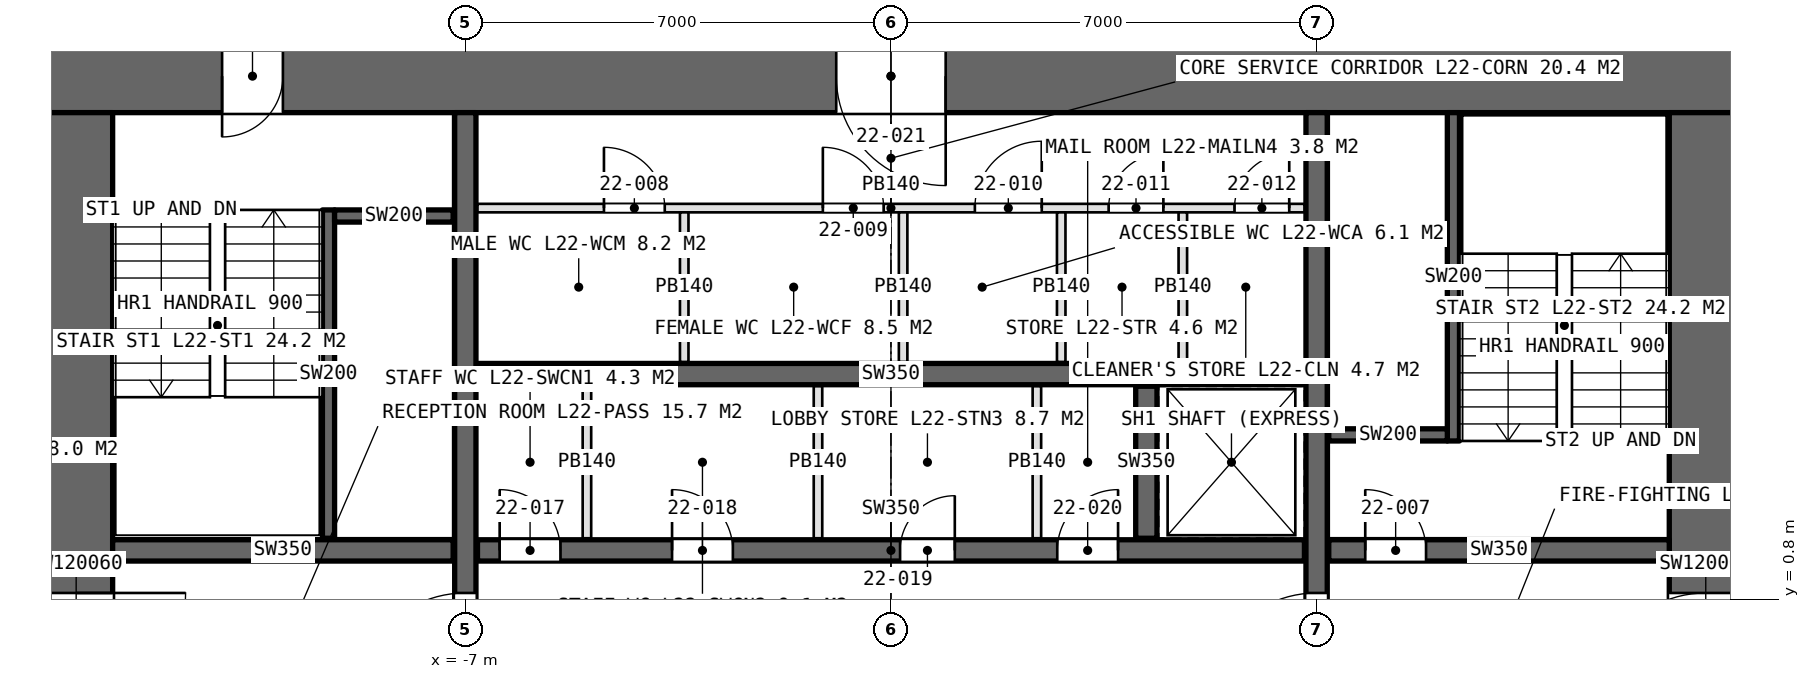
"""IFC4 building model, lengths in metres.
Left out: names, types, materials, properties, quantities, classifications, styles, units other than length and angle.
Written with IfcOpenShell. Run it as: python <this file> out.ifc"""

import sys

from ifc_helpers import new_model, si_unit, direction, frame, frame_2d, origin, place, context, subcontext, project, spatial, rectangle, extrude, element, fill, save


model = new_model("IFC4")
c1 = context("Model", 3, precision=1e-05, world=origin(), true_north=direction((0.0, 1.0)))
c2 = subcontext(c1, "Body", "Model", "MODEL_VIEW")
j1 = project(units=[si_unit("LENGTHUNIT", "METRE"), si_unit("PLANEANGLEUNIT", "RADIAN")], contexts=[c1])
p1 = place(None, origin())
s1 = spatial("IfcSite", under=j1, at=p1, CompositionType="ELEMENT")
p2 = place(p1, origin())
s2 = spatial("IfcBuilding", under=s1, at=p2, CompositionType="ELEMENT")
p3 = place(p2, frame((0.0, 0.0, 109.2)))
s3 = spatial("IfcBuildingStorey", under=s2, at=p3, CompositionType="ELEMENT", Elevation=109.2)
p4 = place(p3, frame((14.0, 9.4, 0.0), z_axis=(0.0, 0.0, 1.0), x_axis=(-1.0, 0.0, 0.0)))
e1 = element("IfcWall", 1, at=p4, inside=s3, PredefinedType="SHEAR", context=c2, shape_type="SweptSolid", body=[
    extrude(rectangle(XDim=28.0, YDim=1.2, at=frame_2d((14.0, 0.0))), origin(), (0.0, 0.0, 1.0), 4.2),
])
p5 = place(p4, frame((24.0, 0.0, 0.0)))
e2 = element("IfcOpeningElement", 2, at=p5, cuts=e1, PredefinedType="OPENING", context=c2, shape_type="SweptSolid", body=[
    extrude(rectangle(XDim=1.0, YDim=2.4, at=frame_2d((0.5, 1.2))), frame((0.0, 0.61, 0.0), z_axis=(0.0, -1.0, 0.0), x_axis=(1.0, 0.0, 0.0)), (0.0, 0.0, 1.0), 1.22),
])
p6 = place(p4, frame((13.1, 0.0, 0.0)))
e3 = element("IfcOpeningElement", 3, at=p6, cuts=e1, PredefinedType="OPENING", context=c2, shape_type="SweptSolid", body=[
    extrude(rectangle(XDim=1.8, YDim=2.4, at=frame_2d((0.9, 1.2))), frame((0.0, 0.61, 0.0), z_axis=(0.0, -1.0, 0.0), x_axis=(1.0, 0.0, 0.0)), (0.0, 0.0, 1.0), 1.22),
])
p7 = place(p3, frame((-13.4, 8.8, 0.0), z_axis=(0.0, 0.0, 1.0), x_axis=(0.0, -1.0, 0.0)))
e4 = element("IfcWall", 4, at=p7, inside=s3, PredefinedType="SHEAR", context=c2, shape_type="SweptSolid", body=[
    extrude(rectangle(XDim=17.6, YDim=1.2, at=frame_2d((8.8, 0.0))), origin(), (0.0, 0.0, 1.0), 4.2),
])
p8 = place(p7, frame((7.9, 0.0, 0.0)))
e5 = element("IfcOpeningElement", 5, at=p8, cuts=e4, PredefinedType="OPENING", context=c2, shape_type="SweptSolid", body=[
    extrude(rectangle(XDim=1.8, YDim=2.4, at=frame_2d((0.9, 1.2))), frame((0.0, 0.61, 0.0), z_axis=(0.0, -1.0, 0.0), x_axis=(1.0, 0.0, 0.0)), (0.0, 0.0, 1.0), 1.22),
])
p9 = place(p7, frame((16.5, 0.0, 0.0)))
e6 = element("IfcOpeningElement", 6, at=p9, cuts=e4, PredefinedType="OPENING", context=c2, shape_type="SweptSolid", body=[
    extrude(rectangle(XDim=1.0, YDim=2.4, at=frame_2d((0.5, 1.2))), frame((0.0, 0.61, 0.0), z_axis=(0.0, -1.0, 0.0), x_axis=(1.0, 0.0, 0.0)), (0.0, 0.0, 1.0), 1.22),
])
p10 = place(p3, frame((13.4, -8.8, 0.0), z_axis=(0.0, 0.0, 1.0), x_axis=(0.0, 1.0, 0.0)))
e7 = element("IfcWall", 7, at=p10, inside=s3, PredefinedType="SHEAR", context=c2, shape_type="SweptSolid", body=[
    extrude(rectangle(XDim=17.6, YDim=1.2, at=frame_2d((8.8, 0.0))), origin(), (0.0, 0.0, 1.0), 4.2),
])
p11 = place(p10, frame((7.9, 0.0, 0.0)))
e8 = element("IfcOpeningElement", 8, at=p11, cuts=e7, PredefinedType="OPENING", context=c2, shape_type="SweptSolid", body=[
    extrude(rectangle(XDim=1.8, YDim=2.4, at=frame_2d((0.9, 1.2))), frame((0.0, 0.61, 0.0), z_axis=(0.0, -1.0, 0.0), x_axis=(1.0, 0.0, 0.0)), (0.0, 0.0, 1.0), 1.22),
])
p12 = place(p3, frame((-7.0, -8.8, 0.0), z_axis=(0.0, 0.0, 1.0), x_axis=(0.0, 1.0, 0.0)))
e9 = element("IfcWall", 9, at=p12, inside=s3, PredefinedType="SHEAR", context=c2, shape_type="SweptSolid", body=[
    extrude(rectangle(XDim=17.6, YDim=0.35, at=frame_2d((8.8, 0.0))), origin(), (0.0, 0.0, 1.0), 4.2),
])
p13 = place(p12, frame((7.9, 0.0, 0.0)))
e10 = element("IfcOpeningElement", 10, at=p13, cuts=e9, PredefinedType="OPENING", context=c2, shape_type="SweptSolid", body=[
    extrude(rectangle(XDim=1.8, YDim=2.4, at=frame_2d((0.9, 1.2))), frame((0.0, 0.185, 0.0), z_axis=(0.0, -1.0, 0.0), x_axis=(1.0, 0.0, 0.0)), (0.0, 0.0, 1.0), 0.37),
])
p14 = place(p3, frame((7.0, -8.8, 0.0), z_axis=(0.0, 0.0, 1.0), x_axis=(0.0, 1.0, 0.0)))
e11 = element("IfcWall", 11, at=p14, inside=s3, PredefinedType="SHEAR", context=c2, shape_type="SweptSolid", body=[
    extrude(rectangle(XDim=17.6, YDim=0.35, at=frame_2d((8.8, 0.0))), origin(), (0.0, 0.0, 1.0), 4.2),
])
p15 = place(p14, frame((7.9, 0.0, 0.0)))
e12 = element("IfcOpeningElement", 12, at=p15, cuts=e11, PredefinedType="OPENING", context=c2, shape_type="SweptSolid", body=[
    extrude(rectangle(XDim=1.8, YDim=2.4, at=frame_2d((0.9, 1.2))), frame((0.0, 0.185, 0.0), z_axis=(0.0, -1.0, 0.0), x_axis=(1.0, 0.0, 0.0)), (0.0, 0.0, 1.0), 0.37),
])
p16 = place(p3, frame((-6.8, 1.6, 0.0), z_axis=(0.0, 0.0, 1.0), x_axis=(1.0, 0.0, 0.0)))
e13 = element("IfcWall", 13, at=p16, inside=s3, PredefinedType="SHEAR", context=c2, shape_type="SweptSolid", body=[
    extrude(rectangle(XDim=13.6, YDim=0.35, at=frame_2d((6.8, 0.0))), origin(), (0.0, 0.0, 1.0), 4.2),
])
p17 = place(p16, frame((0.365, 0.0, 0.0)))
e14 = element("IfcOpeningElement", 14, at=p17, cuts=e13, PredefinedType="OPENING", context=c2, shape_type="SweptSolid", body=[
    extrude(rectangle(XDim=1.0, YDim=2.4, at=frame_2d((0.5, 1.2))), frame((0.0, 0.185, 0.0), z_axis=(0.0, -1.0, 0.0), x_axis=(1.0, 0.0, 0.0)), (0.0, 0.0, 1.0), 0.37),
])
p18 = place(p16, frame((3.2, 0.0, 0.0)))
e15 = element("IfcOpeningElement", 15, at=p18, cuts=e13, PredefinedType="OPENING", context=c2, shape_type="SweptSolid", body=[
    extrude(rectangle(XDim=1.0, YDim=2.4, at=frame_2d((0.5, 1.2))), frame((0.0, 0.185, 0.0), z_axis=(0.0, -1.0, 0.0), x_axis=(1.0, 0.0, 0.0)), (0.0, 0.0, 1.0), 0.37),
])
p19 = place(p16, frame((6.95, 0.0, 0.0)))
e16 = element("IfcOpeningElement", 16, at=p19, cuts=e13, PredefinedType="OPENING", context=c2, shape_type="SweptSolid", body=[
    extrude(rectangle(XDim=0.9, YDim=2.4, at=frame_2d((0.45, 1.2))), frame((0.0, 0.185, 0.0), z_axis=(0.0, -1.0, 0.0), x_axis=(1.0, 0.0, 0.0)), (0.0, 0.0, 1.0), 0.37),
])
p20 = place(p16, frame((9.535, 0.0, 0.0)))
e17 = element("IfcOpeningElement", 17, at=p20, cuts=e13, PredefinedType="OPENING", context=c2, shape_type="SweptSolid", body=[
    extrude(rectangle(XDim=1.0, YDim=2.4, at=frame_2d((0.5, 1.2))), frame((0.0, 0.185, 0.0), z_axis=(0.0, -1.0, 0.0), x_axis=(1.0, 0.0, 0.0)), (0.0, 0.0, 1.0), 0.37),
])
p21 = place(p3, frame((-6.8, 4.5, 0.0), z_axis=(0.0, 0.0, 1.0), x_axis=(1.0, 0.0, 0.0)))
e18 = element("IfcWall", 18, at=p21, inside=s3, PredefinedType="SHEAR", context=c2, shape_type="SweptSolid", body=[
    extrude(rectangle(XDim=13.6, YDim=0.35, at=frame_2d((6.8, 0.0))), origin(), (0.0, 0.0, 1.0), 4.2),
])
p22 = place(p3, frame((-12.8, 1.6, 0.0), z_axis=(0.0, 0.0, 1.0), x_axis=(1.0, 0.0, 0.0)))
e19 = element("IfcWall", 19, at=p22, inside=s3, PredefinedType="SHEAR", context=c2, shape_type="SweptSolid", body=[
    extrude(rectangle(XDim=5.6, YDim=0.35, at=frame_2d((2.8, 0.0))), origin(), (0.0, 0.0, 1.0), 4.2),
])
p23 = place(p3, frame((7.2, 1.6, 0.0), z_axis=(0.0, 0.0, 1.0), x_axis=(1.0, 0.0, 0.0)))
e20 = element("IfcWall", 20, at=p23, inside=s3, PredefinedType="SHEAR", context=c2, shape_type="SweptSolid", body=[
    extrude(rectangle(XDim=5.6, YDim=0.35, at=frame_2d((2.8, 0.0))), origin(), (0.0, 0.0, 1.0), 4.2),
])
p24 = place(p23, frame((0.6, 0.0, 0.0)))
e21 = element("IfcOpeningElement", 21, at=p24, cuts=e20, PredefinedType="OPENING", context=c2, shape_type="SweptSolid", body=[
    extrude(rectangle(XDim=1.0, YDim=2.4, at=frame_2d((0.5, 1.2))), frame((0.0, 0.185, 0.0), z_axis=(0.0, -1.0, 0.0), x_axis=(1.0, 0.0, 0.0)), (0.0, 0.0, 1.0), 0.37),
])
p25 = place(p3, frame((4.2, 1.8, 0.0), z_axis=(0.0, 0.0, 1.0), x_axis=(0.0, 1.0, 0.0)))
e22 = element("IfcWall", 22, at=p25, inside=s3, PredefinedType="SHEAR", context=c2, shape_type="SweptSolid", body=[
    extrude(rectangle(XDim=2.5, YDim=0.35, at=frame_2d((1.25, 0.0))), origin(), (0.0, 0.0, 1.0), 4.2),
])
p26 = place(p3, frame((-6.8, 7.23, 0.0), z_axis=(0.0, 0.0, 1.0), x_axis=(1.0, 0.0, 0.0)))
e23 = element("IfcWall", 23, at=p26, inside=s3, PredefinedType="PARTITIONING", context=c2, shape_type="SweptSolid", body=[
    extrude(rectangle(XDim=13.6, YDim=0.14, at=frame_2d((6.8, 0.0))), origin(), (0.0, 0.0, 1.0), 3.95),
])
p27 = place(p26, frame((2.08, 0.0, 0.0)))
e24 = element("IfcOpeningElement", 24, at=p27, cuts=e23, PredefinedType="OPENING", context=c2, shape_type="SweptSolid", body=[
    extrude(rectangle(XDim=1.0, YDim=2.4, at=frame_2d((0.5, 1.2))), frame((0.0, 0.08, 0.0), z_axis=(0.0, -1.0, 0.0), x_axis=(1.0, 0.0, 0.0)), (0.0, 0.0, 1.0), 0.16),
])
p28 = place(p26, frame((5.68, 0.0, 0.0)))
e25 = element("IfcOpeningElement", 25, at=p28, cuts=e23, PredefinedType="OPENING", context=c2, shape_type="SweptSolid", body=[
    extrude(rectangle(XDim=1.0, YDim=2.4, at=frame_2d((0.5, 1.2))), frame((0.0, 0.08, 0.0), z_axis=(0.0, -1.0, 0.0), x_axis=(1.0, 0.0, 0.0)), (0.0, 0.0, 1.0), 0.16),
])
p29 = place(p26, frame((8.18, 0.0, 0.0)))
e26 = element("IfcOpeningElement", 26, at=p29, cuts=e23, PredefinedType="OPENING", context=c2, shape_type="SweptSolid", body=[
    extrude(rectangle(XDim=1.1, YDim=2.4, at=frame_2d((0.55, 1.2))), frame((0.0, 0.08, 0.0), z_axis=(0.0, -1.0, 0.0), x_axis=(1.0, 0.0, 0.0)), (0.0, 0.0, 1.0), 0.16),
])
p30 = place(p26, frame((10.38, 0.0, 0.0)))
e27 = element("IfcOpeningElement", 27, at=p30, cuts=e23, PredefinedType="OPENING", context=c2, shape_type="SweptSolid", body=[
    extrude(rectangle(XDim=0.9, YDim=2.4, at=frame_2d((0.45, 1.2))), frame((0.0, 0.08, 0.0), z_axis=(0.0, -1.0, 0.0), x_axis=(1.0, 0.0, 0.0)), (0.0, 0.0, 1.0), 0.16),
])
p31 = place(p26, frame((12.45, 0.0, 0.0)))
e28 = element("IfcOpeningElement", 28, at=p31, cuts=e23, PredefinedType="OPENING", context=c2, shape_type="SweptSolid", body=[
    extrude(rectangle(XDim=0.9, YDim=2.4, at=frame_2d((0.45, 1.2))), frame((0.0, 0.08, 0.0), z_axis=(0.0, -1.0, 0.0), x_axis=(1.0, 0.0, 0.0)), (0.0, 0.0, 1.0), 0.16),
])
for number, where, z_axis, x_axis in (
    (29, (-3.4, 4.7, 0.0), (0.0, 0.0, 1.0), (0.0, 1.0, 0.0)),
    (30, (0.2, 4.7, 0.0), (0.0, 0.0, 1.0), (0.0, 1.0, 0.0)),
    (31, (2.8, 4.7, 0.0), (0.0, 0.0, 1.0), (0.0, 1.0, 0.0)),
    (32, (4.8, 4.7, 0.0), (0.0, 0.0, 1.0), (0.0, 1.0, 0.0)),
):
    element("IfcWall", number, at=place(p3, frame(where, z_axis=z_axis, x_axis=x_axis)), inside=s3, PredefinedType="PARTITIONING", context=c2, shape_type="SweptSolid", body=[
        extrude(rectangle(XDim=2.46, YDim=0.14, at=frame_2d((1.23, 0.0))), origin(), (0.0, 0.0, 1.0), 3.95),
    ])
for number, where, z_axis, x_axis in (
    (33, (-5.0, 1.8, 0.0), (0.0, 0.0, 1.0), (0.0, 1.0, 0.0)),
    (34, (-1.2, 1.8, 0.0), (0.0, 0.0, 1.0), (0.0, 1.0, 0.0)),
    (35, (2.4, 1.8, 0.0), (0.0, 0.0, 1.0), (0.0, 1.0, 0.0)),
):
    element("IfcWall", number, at=place(p3, frame(where, z_axis=z_axis, x_axis=x_axis)), inside=s3, PredefinedType="PARTITIONING", context=c2, shape_type="SweptSolid", body=[
        extrude(rectangle(XDim=2.5, YDim=0.14, at=frame_2d((1.25, 0.0))), origin(), (0.0, 0.0, 1.0), 3.95),
    ])
p32 = place(p3, frame((-9.25, 7.2, 0.0), z_axis=(0.0, 0.0, 1.0), x_axis=(0.0, -1.0, 0.0)))
e36 = element("IfcWall", 36, at=p32, inside=s3, PredefinedType="SOLIDWALL", context=c2, shape_type="SweptSolid", body=[
    extrude(rectangle(XDim=5.4, YDim=0.2, at=frame_2d((2.7, 0.0))), origin(), (0.0, 0.0, 1.0), 4.2),
])
p33 = place(p3, frame((-9.15, 7.1, 0.0), z_axis=(0.0, 0.0, 1.0), x_axis=(1.0, 0.0, 0.0)))
e37 = element("IfcWall", 37, at=p33, inside=s3, PredefinedType="SOLIDWALL", context=c2, shape_type="SweptSolid", body=[
    extrude(rectangle(XDim=1.95, YDim=0.2, at=frame_2d((0.975, 0.0))), origin(), (0.0, 0.0, 1.0), 4.2),
])
p34 = place(p3, frame((9.25, 3.4, 0.0), z_axis=(0.0, 0.0, 1.0), x_axis=(0.0, 1.0, 0.0)))
e38 = element("IfcWall", 38, at=p34, inside=s3, PredefinedType="SOLIDWALL", context=c2, shape_type="SweptSolid", body=[
    extrude(rectangle(XDim=5.4, YDim=0.2, at=frame_2d((2.7, 0.0))), origin(), (0.0, 0.0, 1.0), 4.2),
])
p35 = place(p3, frame((9.15, 3.5, 0.0), z_axis=(0.0, 0.0, 1.0), x_axis=(-1.0, 0.0, 0.0)))
e39 = element("IfcWall", 39, at=p35, inside=s3, PredefinedType="SOLIDWALL", context=c2, shape_type="SweptSolid", body=[
    extrude(rectangle(XDim=1.95, YDim=0.2, at=frame_2d((0.975, 0.0))), origin(), (0.0, 0.0, 1.0), 4.2),
])
p36 = place(p8, origin())
e40 = element("IfcDoor", 40, at=p36, inside=s3, OperationType="DOUBLE_DOOR_SINGLE_SWING", PredefinedType="DOOR", context=c2, shape_type="SweptSolid", body=[
    extrude(rectangle(XDim=1.8, YDim=2.4, at=frame_2d((0.9, 1.2))), frame((0.0, 0.025, 0.0), z_axis=(0.0, -1.0, 0.0), x_axis=(1.0, 0.0, 0.0)), (0.0, 0.0, 1.0), 0.05),
])
fill(e5, e40)
p37 = place(p11, origin())
e41 = element("IfcDoor", 41, at=p37, inside=s3, OperationType="DOUBLE_DOOR_SINGLE_SWING", PredefinedType="DOOR", context=c2, shape_type="SweptSolid", body=[
    extrude(rectangle(XDim=1.8, YDim=2.4, at=frame_2d((0.9, 1.2))), frame((0.0, 0.025, 0.0), z_axis=(0.0, -1.0, 0.0), x_axis=(1.0, 0.0, 0.0)), (0.0, 0.0, 1.0), 0.05),
])
fill(e8, e41)
p38 = place(p13, origin())
e42 = element("IfcDoor", 42, at=p38, inside=s3, OperationType="DOUBLE_DOOR_SINGLE_SWING", PredefinedType="DOOR", context=c2, shape_type="SweptSolid", body=[
    extrude(rectangle(XDim=1.8, YDim=2.4, at=frame_2d((0.9, 1.2))), frame((0.0, 0.025, 0.0), z_axis=(0.0, -1.0, 0.0), x_axis=(1.0, 0.0, 0.0)), (0.0, 0.0, 1.0), 0.05),
])
fill(e10, e42)
p39 = place(p15, origin())
e43 = element("IfcDoor", 43, at=p39, inside=s3, OperationType="DOUBLE_DOOR_SINGLE_SWING", PredefinedType="DOOR", context=c2, shape_type="SweptSolid", body=[
    extrude(rectangle(XDim=1.8, YDim=2.4, at=frame_2d((0.9, 1.2))), frame((0.0, 0.025, 0.0), z_axis=(0.0, -1.0, 0.0), x_axis=(1.0, 0.0, 0.0)), (0.0, 0.0, 1.0), 0.05),
])
fill(e12, e43)
p40 = place(p5, origin())
e44 = element("IfcDoor", 44, at=p40, inside=s3, OperationType="SINGLE_SWING_RIGHT", PredefinedType="DOOR", context=c2, shape_type="SweptSolid", body=[
    extrude(rectangle(XDim=1.0, YDim=2.4, at=frame_2d((0.5, 1.2))), frame((0.0, 0.025, 0.0), z_axis=(0.0, -1.0, 0.0), x_axis=(1.0, 0.0, 0.0)), (0.0, 0.0, 1.0), 0.05),
])
fill(e2, e44)
p41 = place(p24, origin())
e45 = element("IfcDoor", 45, at=p41, inside=s3, OperationType="SINGLE_SWING_LEFT", PredefinedType="DOOR", context=c2, shape_type="SweptSolid", body=[
    extrude(rectangle(XDim=1.0, YDim=2.4, at=frame_2d((0.5, 1.2))), frame((0.0, 0.025, 0.0), z_axis=(0.0, -1.0, 0.0), x_axis=(1.0, 0.0, 0.0)), (0.0, 0.0, 1.0), 0.05),
])
fill(e21, e45)
p42 = place(p27, origin())
e46 = element("IfcDoor", 46, at=p42, inside=s3, OperationType="SINGLE_SWING_LEFT", PredefinedType="DOOR", context=c2, shape_type="SweptSolid", body=[
    extrude(rectangle(XDim=1.0, YDim=2.4, at=frame_2d((0.5, 1.2))), frame((0.0, 0.025, 0.0), z_axis=(0.0, -1.0, 0.0), x_axis=(1.0, 0.0, 0.0)), (0.0, 0.0, 1.0), 0.05),
])
fill(e24, e46)
p43 = place(p28, origin())
e47 = element("IfcDoor", 47, at=p43, inside=s3, OperationType="SINGLE_SWING_LEFT", PredefinedType="DOOR", context=c2, shape_type="SweptSolid", body=[
    extrude(rectangle(XDim=1.0, YDim=2.4, at=frame_2d((0.5, 1.2))), frame((0.0, 0.025, 0.0), z_axis=(0.0, -1.0, 0.0), x_axis=(1.0, 0.0, 0.0)), (0.0, 0.0, 1.0), 0.05),
])
fill(e25, e47)
p44 = place(p29, origin())
e48 = element("IfcDoor", 48, at=p44, inside=s3, OperationType="SINGLE_SWING_RIGHT", PredefinedType="DOOR", context=c2, shape_type="SweptSolid", body=[
    extrude(rectangle(XDim=1.1, YDim=2.4, at=frame_2d((0.55, 1.2))), frame((0.0, 0.025, 0.0), z_axis=(0.0, -1.0, 0.0), x_axis=(1.0, 0.0, 0.0)), (0.0, 0.0, 1.0), 0.05),
])
fill(e26, e48)
p45 = place(p30, origin())
e49 = element("IfcDoor", 49, at=p45, inside=s3, OperationType="SINGLE_SWING_RIGHT", PredefinedType="DOOR", context=c2, shape_type="SweptSolid", body=[
    extrude(rectangle(XDim=0.9, YDim=2.4, at=frame_2d((0.45, 1.2))), frame((0.0, 0.025, 0.0), z_axis=(0.0, -1.0, 0.0), x_axis=(1.0, 0.0, 0.0)), (0.0, 0.0, 1.0), 0.05),
])
fill(e27, e49)
p46 = place(p31, origin())
e50 = element("IfcDoor", 50, at=p46, inside=s3, OperationType="SINGLE_SWING_RIGHT", PredefinedType="DOOR", context=c2, shape_type="SweptSolid", body=[
    extrude(rectangle(XDim=0.9, YDim=2.4, at=frame_2d((0.45, 1.2))), frame((0.0, 0.025, 0.0), z_axis=(0.0, -1.0, 0.0), x_axis=(1.0, 0.0, 0.0)), (0.0, 0.0, 1.0), 0.05),
])
fill(e28, e50)
p47 = place(p17, origin())
e51 = element("IfcDoor", 51, at=p47, inside=s3, OperationType="SINGLE_SWING_LEFT", PredefinedType="DOOR", context=c2, shape_type="SweptSolid", body=[
    extrude(rectangle(XDim=1.0, YDim=2.4, at=frame_2d((0.5, 1.2))), frame((0.0, 0.025, 0.0), z_axis=(0.0, -1.0, 0.0), x_axis=(1.0, 0.0, 0.0)), (0.0, 0.0, 1.0), 0.05),
])
fill(e14, e51)
p48 = place(p18, origin())
e52 = element("IfcDoor", 52, at=p48, inside=s3, OperationType="SINGLE_SWING_LEFT", PredefinedType="DOOR", context=c2, shape_type="SweptSolid", body=[
    extrude(rectangle(XDim=1.0, YDim=2.4, at=frame_2d((0.5, 1.2))), frame((0.0, 0.025, 0.0), z_axis=(0.0, -1.0, 0.0), x_axis=(1.0, 0.0, 0.0)), (0.0, 0.0, 1.0), 0.05),
])
fill(e15, e52)
p49 = place(p19, origin())
e53 = element("IfcDoor", 53, at=p49, inside=s3, OperationType="SINGLE_SWING_RIGHT", PredefinedType="DOOR", context=c2, shape_type="SweptSolid", body=[
    extrude(rectangle(XDim=0.9, YDim=2.4, at=frame_2d((0.45, 1.2))), frame((0.0, 0.025, 0.0), z_axis=(0.0, -1.0, 0.0), x_axis=(1.0, 0.0, 0.0)), (0.0, 0.0, 1.0), 0.05),
])
fill(e16, e53)
p50 = place(p20, origin())
e54 = element("IfcDoor", 54, at=p50, inside=s3, OperationType="SINGLE_SWING_RIGHT", PredefinedType="DOOR", context=c2, shape_type="SweptSolid", body=[
    extrude(rectangle(XDim=1.0, YDim=2.4, at=frame_2d((0.5, 1.2))), frame((0.0, 0.025, 0.0), z_axis=(0.0, -1.0, 0.0), x_axis=(1.0, 0.0, 0.0)), (0.0, 0.0, 1.0), 0.05),
])
fill(e17, e54)
p51 = place(p6, origin())
e55 = element("IfcDoor", 55, at=p51, inside=s3, OperationType="DOUBLE_DOOR_SINGLE_SWING", PredefinedType="DOOR", context=c2, shape_type="SweptSolid", body=[
    extrude(rectangle(XDim=1.8, YDim=2.4, at=frame_2d((0.9, 1.2))), frame((0.0, 0.025, 0.0), z_axis=(0.0, -1.0, 0.0), x_axis=(1.0, 0.0, 0.0)), (0.0, 0.0, 1.0), 0.05),
])
fill(e3, e55)
save(model, sys.argv[1])
